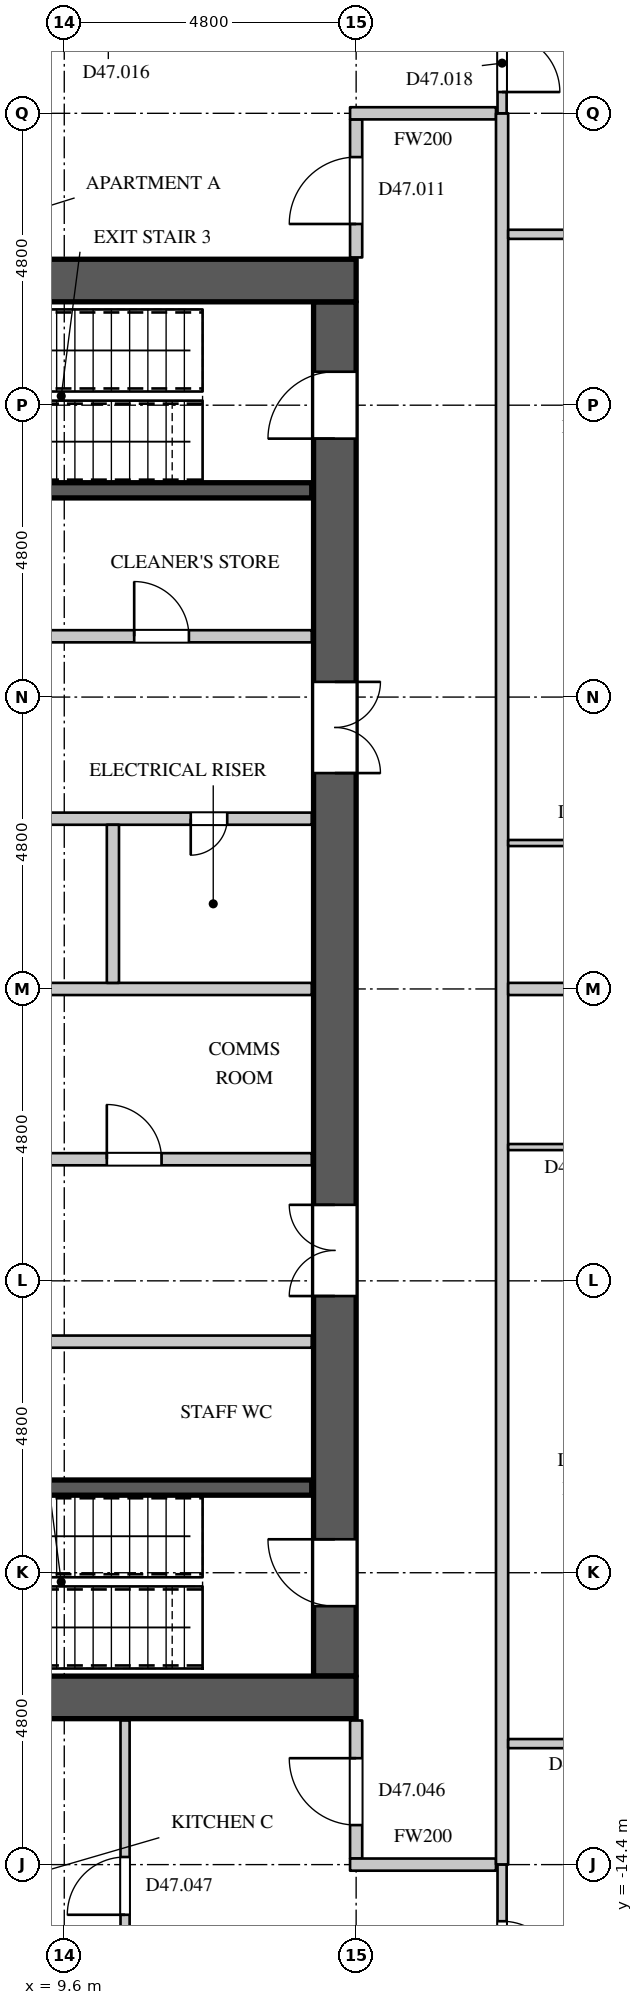
"""IFC4 building model, lengths in metres.
Left out: names, types, materials, properties, quantities, classifications, styles, units other than length and angle.
Written with IfcOpenShell. Run it as: python <this file> out.ifc"""

import sys

from ifc_helpers import new_model, si_unit, direction, frame, frame_2d, origin, place, context, subcontext, project, spatial, rectangle, extrude, element, fill, save


model = new_model("IFC4")
c1 = context("Model", 3, precision=1e-05, world=origin(), true_north=direction((0.0, 1.0)))
c2 = subcontext(c1, "Body", "Model", "MODEL_VIEW")
j1 = project(units=[si_unit("LENGTHUNIT", "METRE"), si_unit("PLANEANGLEUNIT", "RADIAN")], contexts=[c1])
p1 = place(None, origin())
s1 = spatial("IfcSite", under=j1, at=p1, CompositionType="ELEMENT")
p2 = place(p1, origin())
s2 = spatial("IfcBuilding", under=s1, at=p2, CompositionType="ELEMENT")
p3 = place(p2, frame((0.0, 0.0, 204.3)))
s3 = spatial("IfcBuildingStorey", under=s2, at=p3, CompositionType="ELEMENT", Elevation=204.3)
for number, where, z_axis, x_axis in (
    (1, (-14.4, 11.65, 0.0), (0.0, 0.0, 1.0), (1.0, 0.0, 0.0)),
    (2, (-14.4, -11.65, 0.0), (0.0, 0.0, 1.0), (1.0, 0.0, 0.0)),
):
    element("IfcWall", number, at=place(p3, frame(where, z_axis=z_axis, x_axis=x_axis)), inside=s3, PredefinedType="SHEAR", context=c2, shape_type="SweptSolid", body=[
        extrude(rectangle(XDim=28.8, YDim=0.7, at=frame_2d((14.4, 0.0))), origin(), (0.0, 0.0, 1.0), 4.2),
    ])
p4 = place(p3, frame((14.05, -11.3, 0.0), z_axis=(0.0, 0.0, 1.0), x_axis=(0.0, 1.0, 0.0)))
e3 = element("IfcWall", 3, at=p4, inside=s3, PredefinedType="SHEAR", context=c2, shape_type="SweptSolid", body=[
    extrude(rectangle(XDim=22.6, YDim=0.7, at=frame_2d((11.3, 0.0))), origin(), (0.0, 0.0, 1.0), 4.2),
])
p5 = place(p4, frame((20.35, 0.0, 0.0)))
e4 = element("IfcOpeningElement", 4, at=p5, cuts=e3, PredefinedType="OPENING", context=c2, shape_type="SweptSolid", body=[
    extrude(rectangle(XDim=1.1, YDim=2.2, at=frame_2d((0.55, 1.1))), frame((0.0, 0.36, 0.0), z_axis=(0.0, -1.0, 0.0), x_axis=(1.0, 0.0, 0.0)), (0.0, 0.0, 1.0), 0.72),
])
p6 = place(p4, frame((1.15, 0.0, 0.0)))
e5 = element("IfcOpeningElement", 5, at=p6, cuts=e3, PredefinedType="OPENING", context=c2, shape_type="SweptSolid", body=[
    extrude(rectangle(XDim=1.1, YDim=2.2, at=frame_2d((0.55, 1.1))), frame((0.0, 0.36, 0.0), z_axis=(0.0, -1.0, 0.0), x_axis=(1.0, 0.0, 0.0)), (0.0, 0.0, 1.0), 0.72),
])
p7 = place(p4, frame((14.85, 0.0, 0.0)))
e6 = element("IfcOpeningElement", 6, at=p7, cuts=e3, PredefinedType="OPENING", context=c2, shape_type="SweptSolid", body=[
    extrude(rectangle(XDim=1.5, YDim=2.4, at=frame_2d((0.75, 1.2))), frame((0.0, 0.36, 0.0), z_axis=(0.0, -1.0, 0.0), x_axis=(1.0, 0.0, 0.0)), (0.0, 0.0, 1.0), 0.72),
])
p8 = place(p4, frame((6.25, 0.0, 0.0)))
e7 = element("IfcOpeningElement", 7, at=p8, cuts=e3, PredefinedType="OPENING", context=c2, shape_type="SweptSolid", body=[
    extrude(rectangle(XDim=1.5, YDim=2.4, at=frame_2d((0.75, 1.2))), frame((0.0, 0.36, 0.0), z_axis=(0.0, -1.0, 0.0), x_axis=(1.0, 0.0, 0.0)), (0.0, 0.0, 1.0), 0.72),
])
p9 = place(p3, frame((-7.7, 5.8, 0.0), z_axis=(0.0, 0.0, 1.0), x_axis=(1.0, 0.0, 0.0)))
e8 = element("IfcWall", 8, at=p9, inside=s3, PredefinedType="PARTITIONING", context=c2, shape_type="SweptSolid", body=[
    extrude(rectangle(XDim=21.37, YDim=0.2, at=frame_2d((10.685, 0.0))), origin(), (0.0, 0.0, 1.0), 3.798),
])
p10 = place(p9, frame((1.35, 0.0, 0.0)))
e9 = element("IfcOpeningElement", 9, at=p10, cuts=e8, PredefinedType="OPENING", context=c2, shape_type="SweptSolid", body=[
    extrude(rectangle(XDim=0.9, YDim=2.2, at=frame_2d((0.45, 1.1))), frame((0.0, 0.11, 0.0), z_axis=(0.0, -1.0, 0.0), x_axis=(1.0, 0.0, 0.0)), (0.0, 0.0, 1.0), 0.22),
])
p11 = place(p9, frame((5.85, 0.0, 0.0)))
e10 = element("IfcOpeningElement", 10, at=p11, cuts=e8, PredefinedType="OPENING", context=c2, shape_type="SweptSolid", body=[
    extrude(rectangle(XDim=0.9, YDim=2.2, at=frame_2d((0.45, 1.1))), frame((0.0, 0.11, 0.0), z_axis=(0.0, -1.0, 0.0), x_axis=(1.0, 0.0, 0.0)), (0.0, 0.0, 1.0), 0.22),
])
p12 = place(p9, frame((12.3, 0.0, 0.0)))
e11 = element("IfcOpeningElement", 11, at=p12, cuts=e8, PredefinedType="OPENING", context=c2, shape_type="SweptSolid", body=[
    extrude(rectangle(XDim=0.9, YDim=2.2, at=frame_2d((0.45, 1.1))), frame((0.0, 0.11, 0.0), z_axis=(0.0, -1.0, 0.0), x_axis=(1.0, 0.0, 0.0)), (0.0, 0.0, 1.0), 0.22),
])
p13 = place(p9, frame((18.45, 0.0, 0.0)))
e12 = element("IfcOpeningElement", 12, at=p13, cuts=e8, PredefinedType="OPENING", context=c2, shape_type="SweptSolid", body=[
    extrude(rectangle(XDim=0.9, YDim=2.2, at=frame_2d((0.45, 1.1))), frame((0.0, 0.11, 0.0), z_axis=(0.0, -1.0, 0.0), x_axis=(1.0, 0.0, 0.0)), (0.0, 0.0, 1.0), 0.22),
])
p14 = place(p3, frame((3.98, -5.8, 0.0), z_axis=(0.0, 0.0, 1.0), x_axis=(1.0, 0.0, 0.0)))
e13 = element("IfcWall", 13, at=p14, inside=s3, PredefinedType="PARTITIONING", context=c2, shape_type="SweptSolid", body=[
    extrude(rectangle(XDim=9.69, YDim=0.2, at=frame_2d((4.845, 0.0))), origin(), (0.0, 0.0, 1.0), 3.798),
])
p15 = place(p14, frame((4.4, 0.0, 0.0)))
e14 = element("IfcOpeningElement", 14, at=p15, cuts=e13, PredefinedType="OPENING", context=c2, shape_type="SweptSolid", body=[
    extrude(rectangle(XDim=0.9, YDim=2.2, at=frame_2d((0.45, 1.1))), frame((0.0, 0.11, 0.0), z_axis=(0.0, -1.0, 0.0), x_axis=(1.0, 0.0, 0.0)), (0.0, 0.0, 1.0), 0.22),
])
p16 = place(p3, frame((14.4, -14.3, 0.0), z_axis=(0.0, 0.0, 1.0), x_axis=(0.0, 1.0, 0.0)))
e15 = element("IfcWall", 15, at=p16, inside=s3, PredefinedType="PARTITIONING", context=c2, shape_type="SweptSolid", body=[
    extrude(rectangle(XDim=2.27, YDim=0.2, at=frame_2d((1.135, 0.0))), origin(), (0.0, 0.0, 1.0), 3.798),
])
p17 = place(p16, frame((0.55, 0.0, 0.0)))
e16 = element("IfcOpeningElement", 16, at=p17, cuts=e15, PredefinedType="OPENING", context=c2, shape_type="SweptSolid", body=[
    extrude(rectangle(XDim=1.1, YDim=2.4, at=frame_2d((0.55, 1.2))), frame((0.0, 0.11, 0.0), z_axis=(0.0, -1.0, 0.0), x_axis=(1.0, 0.0, 0.0)), (0.0, 0.0, 1.0), 0.22),
])
p18 = place(p3, frame((14.3, -14.4, 0.0), z_axis=(0.0, 0.0, 1.0), x_axis=(1.0, 0.0, 0.0)))
e17 = element("IfcWall", 17, at=p18, inside=s3, PredefinedType="PARTITIONING", context=c2, shape_type="SweptSolid", body=[
    extrude(rectangle(XDim=2.4, YDim=0.2, at=frame_2d((1.2, 0.0))), origin(), (0.0, 0.0, 1.0), 3.798),
])
p19 = place(p3, frame((14.4, 12.03, 0.0), z_axis=(0.0, 0.0, 1.0), x_axis=(0.0, 1.0, 0.0)))
e18 = element("IfcWall", 18, at=p19, inside=s3, PredefinedType="PARTITIONING", context=c2, shape_type="SweptSolid", body=[
    extrude(rectangle(XDim=2.27, YDim=0.2, at=frame_2d((1.135, 0.0))), origin(), (0.0, 0.0, 1.0), 3.798),
])
p20 = place(p19, frame((0.55, 0.0, 0.0)))
e19 = element("IfcOpeningElement", 19, at=p20, cuts=e18, PredefinedType="OPENING", context=c2, shape_type="SweptSolid", body=[
    extrude(rectangle(XDim=1.1, YDim=2.4, at=frame_2d((0.55, 1.2))), frame((0.0, 0.11, 0.0), z_axis=(0.0, -1.0, 0.0), x_axis=(1.0, 0.0, 0.0)), (0.0, 0.0, 1.0), 0.22),
])
p21 = place(p3, frame((14.3, 14.4, 0.0), z_axis=(0.0, 0.0, 1.0), x_axis=(1.0, 0.0, 0.0)))
e20 = element("IfcWall", 20, at=p21, inside=s3, PredefinedType="PARTITIONING", context=c2, shape_type="SweptSolid", body=[
    extrude(rectangle(XDim=2.4, YDim=0.2, at=frame_2d((1.2, 0.0))), origin(), (0.0, 0.0, 1.0), 3.798),
])
p22 = place(p3, frame((16.8, -14.4, 0.0), z_axis=(0.0, 0.0, 1.0), x_axis=(0.0, 1.0, 0.0)))
e21 = element("IfcWall", 21, at=p22, inside=s3, PredefinedType="PARTITIONING", context=c2, shape_type="SweptSolid", body=[
    extrude(rectangle(XDim=28.8, YDim=0.2, at=frame_2d((14.4, 0.0))), origin(), (0.0, 0.0, 1.0), 3.798),
])
p23 = place(p3, frame((10.6, -17.425, 0.0), z_axis=(0.0, 0.0, 1.0), x_axis=(0.0, 1.0, 0.0)))
e22 = element("IfcWall", 22, at=p23, inside=s3, PredefinedType="PARTITIONING", context=c2, shape_type="SweptSolid", body=[
    extrude(rectangle(XDim=5.395, YDim=0.15, at=frame_2d((2.698, 0.0))), origin(), (0.0, 0.0, 1.0), 3.798),
])
p24 = place(p23, frame((2.2, 0.0, 0.0)))
e23 = element("IfcOpeningElement", 23, at=p24, cuts=e22, PredefinedType="OPENING", context=c2, shape_type="SweptSolid", body=[
    extrude(rectangle(XDim=0.95, YDim=2.2, at=frame_2d((0.475, 1.1))), frame((0.0, 0.085, 0.0), z_axis=(0.0, -1.0, 0.0), x_axis=(1.0, 0.0, 0.0)), (0.0, 0.0, 1.0), 0.17),
])
p25 = place(p3, frame((16.8, -18.131, 0.0), z_axis=(0.0, 0.0, 1.0), x_axis=(0.0, 1.0, 0.0)))
e24 = element("IfcWall", 24, at=p25, inside=s3, PredefinedType="PARTITIONING", context=c2, shape_type="SweptSolid", body=[
    extrude(rectangle(XDim=3.731, YDim=0.15, at=frame_2d((1.865, 0.0))), origin(), (0.0, 0.0, 1.0), 3.798),
])
p26 = place(p25, frame((1.85, 0.0, 0.0)))
e25 = element("IfcOpeningElement", 25, at=p26, cuts=e24, PredefinedType="OPENING", context=c2, shape_type="SweptSolid", body=[
    extrude(rectangle(XDim=0.95, YDim=2.2, at=frame_2d((0.475, 1.1))), frame((0.0, 0.085, 0.0), z_axis=(0.0, -1.0, 0.0), x_axis=(1.0, 0.0, 0.0)), (0.0, 0.0, 1.0), 0.17),
])
p27 = place(p3, frame((16.9, -12.41, 0.0), z_axis=(0.0, 0.0, 1.0), x_axis=(1.0, 0.0, 0.0)))
e26 = element("IfcWall", 26, at=p27, inside=s3, PredefinedType="PARTITIONING", context=c2, shape_type="SweptSolid", body=[
    extrude(rectangle(XDim=5.629, YDim=0.15, at=frame_2d((2.815, 0.0))), origin(), (0.0, 0.0, 1.0), 3.798),
])
p28 = place(p27, frame((1.1, 0.0, 0.0)))
e27 = element("IfcOpeningElement", 27, at=p28, cuts=e26, PredefinedType="OPENING", context=c2, shape_type="SweptSolid", body=[
    extrude(rectangle(XDim=0.95, YDim=2.2, at=frame_2d((0.475, 1.1))), frame((0.0, 0.085, 0.0), z_axis=(0.0, -1.0, 0.0), x_axis=(1.0, 0.0, 0.0)), (0.0, 0.0, 1.0), 0.17),
])
p29 = place(p3, frame((16.9, 12.41, 0.0), z_axis=(0.0, 0.0, 1.0), x_axis=(1.0, 0.0, 0.0)))
e28 = element("IfcWall", 28, at=p29, inside=s3, PredefinedType="PARTITIONING", context=c2, shape_type="SweptSolid", body=[
    extrude(rectangle(XDim=5.629, YDim=0.15, at=frame_2d((2.815, 0.0))), origin(), (0.0, 0.0, 1.0), 3.798),
])
p30 = place(p29, frame((1.0, 0.0, 0.0)))
e29 = element("IfcOpeningElement", 29, at=p30, cuts=e28, PredefinedType="OPENING", context=c2, shape_type="SweptSolid", body=[
    extrude(rectangle(XDim=0.95, YDim=2.2, at=frame_2d((0.475, 1.1))), frame((0.0, 0.085, 0.0), z_axis=(0.0, -1.0, 0.0), x_axis=(1.0, 0.0, 0.0)), (0.0, 0.0, 1.0), 0.17),
])
p31 = place(p29, frame((4.05, 0.0, 0.0)))
e30 = element("IfcOpeningElement", 30, at=p31, cuts=e28, PredefinedType="OPENING", context=c2, shape_type="SweptSolid", body=[
    extrude(rectangle(XDim=0.95, YDim=2.2, at=frame_2d((0.475, 1.1))), frame((0.0, 0.085, 0.0), z_axis=(0.0, -1.0, 0.0), x_axis=(1.0, 0.0, 0.0)), (0.0, 0.0, 1.0), 0.17),
])
p32 = place(p3, frame((16.8, 14.4, 0.0), z_axis=(0.0, 0.0, 1.0), x_axis=(0.0, 1.0, 0.0)))
e31 = element("IfcWall", 31, at=p32, inside=s3, PredefinedType="PARTITIONING", context=c2, shape_type="SweptSolid", body=[
    extrude(rectangle(XDim=3.731, YDim=0.15, at=frame_2d((1.865, 0.0))), origin(), (0.0, 0.0, 1.0), 3.798),
])
p33 = place(p32, frame((0.35, 0.0, 0.0)))
e32 = element("IfcOpeningElement", 32, at=p33, cuts=e31, PredefinedType="OPENING", context=c2, shape_type="SweptSolid", body=[
    extrude(rectangle(XDim=0.95, YDim=2.2, at=frame_2d((0.475, 1.1))), frame((0.0, 0.085, 0.0), z_axis=(0.0, -1.0, 0.0), x_axis=(1.0, 0.0, 0.0)), (0.0, 0.0, 1.0), 0.17),
])
p34 = place(p3, frame((16.9, 0.0, 0.0), z_axis=(0.0, 0.0, 1.0), x_axis=(1.0, 0.0, 0.0)))
e33 = element("IfcWall", 33, at=p34, inside=s3, PredefinedType="PARTITIONING", context=c2, shape_type="SweptSolid", body=[
    extrude(rectangle(XDim=7.155, YDim=0.2, at=frame_2d((3.578, 0.0))), origin(), (0.0, 0.0, 1.0), 3.798),
])
p35 = place(p3, frame((-7.82, 2.8, 0.0), z_axis=(0.0, 0.0, 1.0), x_axis=(1.0, 0.0, 0.0)))
e34 = element("IfcWall", 34, at=p35, inside=s3, PredefinedType="PARTITIONING", context=c2, shape_type="SweptSolid", body=[
    extrude(rectangle(XDim=21.49, YDim=0.2, at=frame_2d((10.745, 0.0))), origin(), (0.0, 0.0, 1.0), 3.798),
])
p36 = place(p35, frame((19.5, 0.0, 0.0)))
e35 = element("IfcOpeningElement", 35, at=p36, cuts=e34, PredefinedType="OPENING", context=c2, shape_type="SweptSolid", body=[
    extrude(rectangle(XDim=0.6, YDim=2.0, at=frame_2d((0.3, 1.0))), frame((0.0, 0.11, 0.0), z_axis=(0.0, -1.0, 0.0), x_axis=(1.0, 0.0, 0.0)), (0.0, 0.0, 1.0), 0.22),
])
p37 = place(p35, frame((3.25, 0.0, 0.0)))
e36 = element("IfcOpeningElement", 36, at=p37, cuts=e34, PredefinedType="OPENING", context=c2, shape_type="SweptSolid", body=[
    extrude(rectangle(XDim=0.9, YDim=2.2, at=frame_2d((0.45, 1.1))), frame((0.0, 0.11, 0.0), z_axis=(0.0, -1.0, 0.0), x_axis=(1.0, 0.0, 0.0)), (0.0, 0.0, 1.0), 0.22),
])
p38 = place(p35, frame((12.25, 0.0, 0.0)))
e37 = element("IfcOpeningElement", 37, at=p38, cuts=e34, PredefinedType="OPENING", context=c2, shape_type="SweptSolid", body=[
    extrude(rectangle(XDim=0.9, YDim=2.2, at=frame_2d((0.45, 1.1))), frame((0.0, 0.11, 0.0), z_axis=(0.0, -1.0, 0.0), x_axis=(1.0, 0.0, 0.0)), (0.0, 0.0, 1.0), 0.22),
])
p39 = place(p3, frame((7.8, -2.8, 0.0), z_axis=(0.0, 0.0, 1.0), x_axis=(1.0, 0.0, 0.0)))
e38 = element("IfcWall", 38, at=p39, inside=s3, PredefinedType="PARTITIONING", context=c2, shape_type="SweptSolid", body=[
    extrude(rectangle(XDim=5.87, YDim=0.2, at=frame_2d((2.935, 0.0))), origin(), (0.0, 0.0, 1.0), 3.798),
])
p40 = place(p39, frame((2.5, 0.0, 0.0)))
e39 = element("IfcOpeningElement", 39, at=p40, cuts=e38, PredefinedType="OPENING", context=c2, shape_type="SweptSolid", body=[
    extrude(rectangle(XDim=0.9, YDim=2.2, at=frame_2d((0.45, 1.1))), frame((0.0, 0.11, 0.0), z_axis=(0.0, -1.0, 0.0), x_axis=(1.0, 0.0, 0.0)), (0.0, 0.0, 1.0), 0.22),
])
p41 = place(p3, frame((7.8, 0.0, 0.0), z_axis=(0.0, 0.0, 1.0), x_axis=(1.0, 0.0, 0.0)))
e40 = element("IfcWall", 40, at=p41, inside=s3, PredefinedType="PARTITIONING", context=c2, shape_type="SweptSolid", body=[
    extrude(rectangle(XDim=5.87, YDim=0.2, at=frame_2d((2.935, 0.0))), origin(), (0.0, 0.0, 1.0), 3.798),
])
p42 = place(p3, frame((10.4, 0.1, 0.0), z_axis=(0.0, 0.0, 1.0), x_axis=(0.0, 1.0, 0.0)))
e41 = element("IfcWall", 41, at=p42, inside=s3, PredefinedType="PARTITIONING", context=c2, shape_type="SweptSolid", body=[
    extrude(rectangle(XDim=2.6, YDim=0.2, at=frame_2d((1.3, 0.0))), origin(), (0.0, 0.0, 1.0), 3.798),
])
for number, where, z_axis, x_axis in (
    (42, (5.275, -8.2, 0.0), (0.0, 0.0, 1.0), (1.0, 0.0, 0.0)),
    (43, (5.275, 8.2, 0.0), (0.0, 0.0, 1.0), (1.0, 0.0, 0.0)),
):
    element("IfcWall", number, at=place(p3, frame(where, z_axis=z_axis, x_axis=x_axis)), inside=s3, PredefinedType="SHEAR", context=c2, shape_type="SweptSolid", body=[
        extrude(rectangle(XDim=8.395, YDim=0.25, at=frame_2d((4.198, 0.0))), origin(), (0.0, 0.0, 1.0), 3.798),
    ])
p43 = place(p3, frame((16.9, -2.6, 0.0), z_axis=(0.0, 0.0, 1.0), x_axis=(1.0, 0.0, 0.0)))
e44 = element("IfcWall", 44, at=p43, inside=s3, PredefinedType="PARTITIONING", context=c2, shape_type="SweptSolid", body=[
    extrude(rectangle(XDim=3.025, YDim=0.1, at=frame_2d((1.513, 0.0))), origin(), (0.0, 0.0, 1.0), 3.798),
])
p44 = place(p43, frame((1.05, 0.0, 0.0)))
e45 = element("IfcOpeningElement", 45, at=p44, cuts=e44, PredefinedType="OPENING", context=c2, shape_type="SweptSolid", body=[
    extrude(rectangle(XDim=0.9, YDim=2.2, at=frame_2d((0.45, 1.1))), frame((0.0, 0.06, 0.0), z_axis=(0.0, -1.0, 0.0), x_axis=(1.0, 0.0, 0.0)), (0.0, 0.0, 1.0), 0.12),
])
p45 = place(p3, frame((16.9, 2.4, 0.0), z_axis=(0.0, 0.0, 1.0), x_axis=(1.0, 0.0, 0.0)))
e46 = element("IfcWall", 46, at=p45, inside=s3, PredefinedType="PARTITIONING", context=c2, shape_type="SweptSolid", body=[
    extrude(rectangle(XDim=3.075, YDim=0.1, at=frame_2d((1.538, 0.0))), origin(), (0.0, 0.0, 1.0), 3.798),
])
p46 = place(p45, frame((1.05, 0.0, 0.0)))
e47 = element("IfcOpeningElement", 47, at=p46, cuts=e46, PredefinedType="OPENING", context=c2, shape_type="SweptSolid", body=[
    extrude(rectangle(XDim=0.9, YDim=2.2, at=frame_2d((0.45, 1.1))), frame((0.0, 0.06, 0.0), z_axis=(0.0, -1.0, 0.0), x_axis=(1.0, 0.0, 0.0)), (0.0, 0.0, 1.0), 0.12),
])
p47 = place(p36, origin())
e48 = element("IfcDoor", 48, at=p47, inside=s3, OperationType="SINGLE_SWING_RIGHT", PredefinedType="DOOR", context=c2, shape_type="SweptSolid", body=[
    extrude(rectangle(XDim=0.6, YDim=2.0, at=frame_2d((0.3, 1.0))), frame((0.0, 0.025, 0.0), z_axis=(0.0, -1.0, 0.0), x_axis=(1.0, 0.0, 0.0)), (0.0, 0.0, 1.0), 0.05),
])
fill(e35, e48)
p48 = place(p40, origin())
e49 = element("IfcDoor", 49, at=p48, inside=s3, OperationType="SINGLE_SWING_LEFT", PredefinedType="DOOR", context=c2, shape_type="SweptSolid", body=[
    extrude(rectangle(XDim=0.9, YDim=2.2, at=frame_2d((0.45, 1.1))), frame((0.0, 0.025, 0.0), z_axis=(0.0, -1.0, 0.0), x_axis=(1.0, 0.0, 0.0)), (0.0, 0.0, 1.0), 0.05),
])
fill(e39, e49)
p49 = place(p13, origin())
e50 = element("IfcDoor", 50, at=p49, inside=s3, OperationType="SINGLE_SWING_LEFT", PredefinedType="DOOR", context=c2, shape_type="SweptSolid", body=[
    extrude(rectangle(XDim=0.9, YDim=2.2, at=frame_2d((0.45, 1.1))), frame((0.0, 0.025, 0.0), z_axis=(0.0, -1.0, 0.0), x_axis=(1.0, 0.0, 0.0)), (0.0, 0.0, 1.0), 0.05),
])
fill(e12, e50)
p50 = place(p5, origin())
e51 = element("IfcDoor", 51, at=p50, inside=s3, OperationType="SINGLE_SWING_LEFT", PredefinedType="DOOR", context=c2, shape_type="SweptSolid", body=[
    extrude(rectangle(XDim=1.1, YDim=2.2, at=frame_2d((0.55, 1.1))), frame((0.0, 0.345, 0.0), z_axis=(0.0, -1.0, 0.0), x_axis=(1.0, 0.0, 0.0)), (0.0, 0.0, 1.0), 0.05),
])
fill(e4, e51)
p51 = place(p6, origin())
e52 = element("IfcDoor", 52, at=p51, inside=s3, OperationType="SINGLE_SWING_RIGHT", PredefinedType="DOOR", context=c2, shape_type="SweptSolid", body=[
    extrude(rectangle(XDim=1.1, YDim=2.2, at=frame_2d((0.55, 1.1))), frame((0.0, 0.345, 0.0), z_axis=(0.0, -1.0, 0.0), x_axis=(1.0, 0.0, 0.0)), (0.0, 0.0, 1.0), 0.05),
])
fill(e5, e52)
p52 = place(p7, origin())
e53 = element("IfcDoor", 53, at=p52, inside=s3, OperationType="DOUBLE_DOOR_SINGLE_SWING", PredefinedType="DOOR", context=c2, shape_type="SweptSolid", body=[
    extrude(rectangle(XDim=1.5, YDim=2.4, at=frame_2d((0.75, 1.2))), frame((0.0, -0.295, 0.0), z_axis=(0.0, -1.0, 0.0), x_axis=(1.0, 0.0, 0.0)), (0.0, 0.0, 1.0), 0.05),
])
fill(e6, e53)
p53 = place(p8, origin())
e54 = element("IfcDoor", 54, at=p53, inside=s3, OperationType="DOUBLE_DOOR_SINGLE_SWING", PredefinedType="DOOR", context=c2, shape_type="SweptSolid", body=[
    extrude(rectangle(XDim=1.5, YDim=2.4, at=frame_2d((0.75, 1.2))), frame((0.0, 0.345, 0.0), z_axis=(0.0, -1.0, 0.0), x_axis=(1.0, 0.0, 0.0)), (0.0, 0.0, 1.0), 0.05),
])
fill(e7, e54)
p54 = place(p20, origin())
e55 = element("IfcDoor", 55, at=p54, inside=s3, OperationType="SINGLE_SWING_LEFT", PredefinedType="DOOR", context=c2, shape_type="SweptSolid", body=[
    extrude(rectangle(XDim=1.1, YDim=2.4, at=frame_2d((0.55, 1.2))), frame((0.0, 0.025, 0.0), z_axis=(0.0, -1.0, 0.0), x_axis=(1.0, 0.0, 0.0)), (0.0, 0.0, 1.0), 0.05),
])
fill(e19, e55)
p55 = place(p33, origin())
e56 = element("IfcDoor", 56, at=p55, inside=s3, OperationType="SINGLE_SWING_RIGHT", PredefinedType="DOOR", context=c2, shape_type="SweptSolid", body=[
    extrude(rectangle(XDim=0.95, YDim=2.2, at=frame_2d((0.475, 1.1))), frame((0.0, 0.025, 0.0), z_axis=(0.0, -1.0, 0.0), x_axis=(1.0, 0.0, 0.0)), (0.0, 0.0, 1.0), 0.05),
])
fill(e32, e56)
p56 = place(p17, origin())
e57 = element("IfcDoor", 57, at=p56, inside=s3, OperationType="SINGLE_SWING_RIGHT", PredefinedType="DOOR", context=c2, shape_type="SweptSolid", body=[
    extrude(rectangle(XDim=1.1, YDim=2.4, at=frame_2d((0.55, 1.2))), frame((0.0, 0.025, 0.0), z_axis=(0.0, -1.0, 0.0), x_axis=(1.0, 0.0, 0.0)), (0.0, 0.0, 1.0), 0.05),
])
fill(e16, e57)
p57 = place(p24, origin())
e58 = element("IfcDoor", 58, at=p57, inside=s3, OperationType="SINGLE_SWING_LEFT", PredefinedType="DOOR", context=c2, shape_type="SweptSolid", body=[
    extrude(rectangle(XDim=0.95, YDim=2.2, at=frame_2d((0.475, 1.1))), frame((0.0, 0.025, 0.0), z_axis=(0.0, -1.0, 0.0), x_axis=(1.0, 0.0, 0.0)), (0.0, 0.0, 1.0), 0.05),
])
fill(e23, e58)
p58 = place(p26, origin())
e59 = element("IfcDoor", 59, at=p58, inside=s3, OperationType="SINGLE_SWING_RIGHT", PredefinedType="DOOR", context=c2, shape_type="SweptSolid", body=[
    extrude(rectangle(XDim=0.95, YDim=2.2, at=frame_2d((0.475, 1.1))), frame((0.0, 0.025, 0.0), z_axis=(0.0, -1.0, 0.0), x_axis=(1.0, 0.0, 0.0)), (0.0, 0.0, 1.0), 0.05),
])
fill(e25, e59)
save(model, sys.argv[1])
